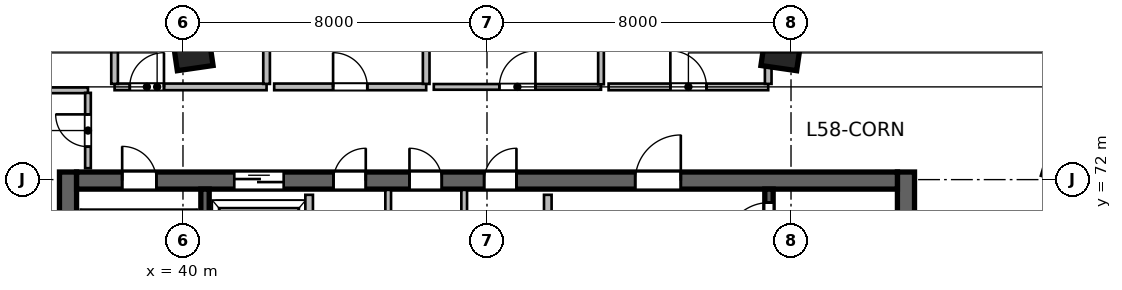
"""IFC4 building model, lengths in metres.
Left out: names, types, materials, properties, quantities, classifications, styles, units other than length and angle.
Written with IfcOpenShell. Run it as: python <this file> out.ifc"""

import sys

from ifc_helpers import new_model, si_unit, direction, frame, frame_2d, origin, origin_2d, place, context, subcontext, project, spatial, rectangle, extrude, source, transform, mapped, element, fill, save


model = new_model("IFC4")
c1 = context("Model", 3, precision=1e-05, world=origin(), true_north=direction((0.0, 1.0)))
c2 = subcontext(c1, "Body", "Model", "MODEL_VIEW")
j1 = project(units=[si_unit("LENGTHUNIT", "METRE"), si_unit("PLANEANGLEUNIT", "RADIAN")], contexts=[c1])
p1 = place(None, origin())
s1 = spatial("IfcSite", under=j1, at=p1, CompositionType="ELEMENT")
p2 = place(p1, origin())
s2 = spatial("IfcBuilding", under=s1, at=p2, CompositionType="ELEMENT")
p3 = place(p2, frame((0.0, 0.0, 239.1)))
s3 = spatial("IfcBuildingStorey", under=s2, at=p3, CompositionType="ELEMENT", Elevation=239.1)
m1 = source(origin(), c2, "Body", "SweptSolid", [
    extrude(rectangle(XDim=12.0, YDim=0.45, at=frame_2d((6.0, 0.0))), origin(), (0.0, 0.0, 1.0), 3.9),
])
for number, where, z_axis, x_axis in (
    (1, (36.975, 60.2, 0.0), (0.0, 0.0, 1.0), (0.0, 1.0, 0.0)),
    (2, (59.025, 60.2, 0.0), (0.0, 0.0, 1.0), (0.0, 1.0, 0.0)),
):
    element("IfcWall", number, at=place(p3, frame(where, z_axis=z_axis, x_axis=x_axis)), inside=s3, PredefinedType="SHEAR", context=c2, shape_type="MappedRepresentation", body=[
        mapped(m1, transform((0.0, 0.0, 0.0), scale=1.0)),
    ])
m2 = source(origin(), c2, "Body", "SweptSolid", [
    extrude(rectangle(XDim=21.6, YDim=0.45, at=frame_2d((10.8, 0.0))), origin(), (0.0, 0.0, 1.0), 3.9),
])
p4 = place(p3, frame((37.2, 71.975, 0.0), z_axis=(0.0, 0.0, 1.0), x_axis=(1.0, 0.0, 0.0)))
e3 = element("IfcWall", 3, at=p4, inside=s3, PredefinedType="SHEAR", context=c2, shape_type="MappedRepresentation", body=[
    mapped(m2, transform((0.0, 0.0, 0.0), scale=1.0)),
])
p5 = place(p4, frame((1.2, 0.0, 0.0)))
e4 = element("IfcOpeningElement", 4, at=p5, cuts=e3, PredefinedType="OPENING", context=c2, shape_type="SweptSolid", body=[
    extrude(rectangle(XDim=0.9, YDim=2.1, at=frame_2d((0.45, 1.05))), frame((0.0, 0.235, 0.0), z_axis=(0.0, -1.0, 0.0), x_axis=(1.0, 0.0, 0.0)), (0.0, 0.0, 1.0), 0.47),
])
p6 = place(p4, frame((14.7, 0.0, 0.0)))
e5 = element("IfcOpeningElement", 5, at=p6, cuts=e3, PredefinedType="OPENING", context=c2, shape_type="SweptSolid", body=[
    extrude(rectangle(XDim=1.2, YDim=2.15, at=frame_2d((0.6, 1.075))), frame((0.0, 0.235, 0.0), z_axis=(0.0, -1.0, 0.0), x_axis=(1.0, 0.0, 0.0)), (0.0, 0.0, 1.0), 0.47),
])
p7 = place(p4, frame((4.15, 0.0, 0.0)))
e6 = element("IfcOpeningElement", 6, at=p7, cuts=e3, PredefinedType="OPENING", context=c2, shape_type="SweptSolid", body=[
    extrude(rectangle(XDim=1.3, YDim=2.15, at=frame_2d((0.65, 1.075))), frame((0.0, 0.235, 0.0), z_axis=(0.0, -1.0, 0.0), x_axis=(1.0, 0.0, 0.0)), (0.0, 0.0, 1.0), 0.47),
])
p8 = place(p4, frame((6.76, 0.0, 0.0)))
e7 = element("IfcOpeningElement", 7, at=p8, cuts=e3, PredefinedType="OPENING", context=c2, shape_type="SweptSolid", body=[
    extrude(rectangle(XDim=0.85, YDim=2.1, at=frame_2d((0.425, 1.05))), frame((0.0, 0.235, 0.0), z_axis=(0.0, -1.0, 0.0), x_axis=(1.0, 0.0, 0.0)), (0.0, 0.0, 1.0), 0.47),
])
p9 = place(p4, frame((8.76, 0.0, 0.0)))
e8 = element("IfcOpeningElement", 8, at=p9, cuts=e3, PredefinedType="OPENING", context=c2, shape_type="SweptSolid", body=[
    extrude(rectangle(XDim=0.85, YDim=2.1, at=frame_2d((0.425, 1.05))), frame((0.0, 0.235, 0.0), z_axis=(0.0, -1.0, 0.0), x_axis=(1.0, 0.0, 0.0)), (0.0, 0.0, 1.0), 0.47),
])
p10 = place(p4, frame((10.725, 0.0, 0.0)))
e9 = element("IfcOpeningElement", 9, at=p10, cuts=e3, PredefinedType="OPENING", context=c2, shape_type="SweptSolid", body=[
    extrude(rectangle(XDim=0.85, YDim=2.1, at=frame_2d((0.425, 1.05))), frame((0.0, 0.235, 0.0), z_axis=(0.0, -1.0, 0.0), x_axis=(1.0, 0.0, 0.0)), (0.0, 0.0, 1.0), 0.47),
])
m3 = source(origin(), c2, "Body", "SweptSolid", [
    extrude(rectangle(XDim=11.1, YDim=0.22, at=frame_2d((5.55, 0.0))), origin(), (0.0, 0.0, 1.0), 3.9),
])
p11 = place(p3, frame((40.58, 60.65, 0.0), z_axis=(0.0, 0.0, 1.0), x_axis=(0.0, 1.0, 0.0)))
e10 = element("IfcWall", 10, at=p11, inside=s3, PredefinedType="SHEAR", context=c2, shape_type="MappedRepresentation", body=[
    mapped(m3, transform((0.0, 0.0, 0.0), scale=1.0)),
])
p12 = place(p3, frame((55.42, 60.65, 0.0), z_axis=(0.0, 0.0, 1.0), x_axis=(0.0, 1.0, 0.0)))
e11 = element("IfcWall", 11, at=p12, inside=s3, PredefinedType="SHEAR", context=c2, shape_type="MappedRepresentation", body=[
    mapped(m3, transform((0.0, 0.0, 0.0), scale=1.0)),
])
p13 = place(p12, frame((9.595, 0.0, 0.0)))
e12 = element("IfcOpeningElement", 12, at=p13, cuts=e11, PredefinedType="OPENING", context=c2, shape_type="SweptSolid", body=[
    extrude(rectangle(XDim=1.15, YDim=2.15, at=frame_2d((0.575, 1.075))), frame((0.0, 0.12, 0.0), z_axis=(0.0, -1.0, 0.0), x_axis=(1.0, 0.0, 0.0)), (0.0, 0.0, 1.0), 0.24),
])
m4 = source(origin(), c2, "Body", "SweptSolid", [
    extrude(rectangle(XDim=0.95, YDim=0.95, at=origin_2d()), origin(), (0.0, 0.0, 1.0), 3.9),
])
for number, where, z_axis, x_axis in (
    (13, (40.253, 75.404, 0.0), (0.0, 0.0, 1.0), (-0.143, 0.99, 0.0)),
    (14, (55.747, 75.404, 0.0), (0.0, 0.0, 1.0), (0.143, 0.99, 0.0)),
):
    element("IfcColumn", number, at=place(p3, frame(where, z_axis=z_axis, x_axis=x_axis)), inside=s3, PredefinedType="COLUMN", context=c2, shape_type="MappedRepresentation", body=[
        mapped(m4, transform((0.0, 0.0, 0.0), scale=1.0)),
    ])
m5 = source(origin(), c2, "Body", "SweptSolid", [
    extrude(rectangle(XDim=5.8, YDim=0.2, at=frame_2d((2.9, 0.0))), origin(), (0.0, 0.0, 1.0), 3.65),
])
p14 = place(p3, frame((49.6, 65.8, 0.0), z_axis=(0.0, 0.0, 1.0), x_axis=(0.0, 1.0, 0.0)))
e15 = element("IfcWall", 15, at=p14, inside=s3, PredefinedType="SOLIDWALL", context=c2, shape_type="MappedRepresentation", body=[
    mapped(m5, transform((0.0, 0.0, 0.0), scale=1.0)),
])
m6 = source(origin(), c2, "Body", "SweptSolid", [
    extrude(rectangle(XDim=3.2, YDim=0.2, at=frame_2d((1.6, 0.0))), origin(), (0.0, 0.0, 1.0), 3.65),
])
p15 = place(p3, frame((43.32, 68.4, 0.0), z_axis=(0.0, 0.0, 1.0), x_axis=(0.0, 1.0, 0.0)))
e16 = element("IfcWall", 16, at=p15, inside=s3, PredefinedType="SOLIDWALL", context=c2, shape_type="MappedRepresentation", body=[
    mapped(m6, transform((0.0, 0.0, 0.0), scale=1.0)),
])
m7 = source(origin(), c2, "Body", "SweptSolid", [
    extrude(rectangle(XDim=3.33, YDim=0.15, at=frame_2d((1.665, 0.0))), origin(), (0.0, 0.0, 1.0), 3.65),
])
for number, where, z_axis, x_axis in (
    (17, (45.4, 68.4, 0.0), (0.0, 0.0, 1.0), (0.0, 1.0, 0.0)),
    (18, (47.4, 68.4, 0.0), (0.0, 0.0, 1.0), (0.0, 1.0, 0.0)),
):
    element("IfcWall", number, at=place(p3, frame(where, z_axis=z_axis, x_axis=x_axis)), inside=s3, PredefinedType="PARTITIONING", context=c2, shape_type="MappedRepresentation", body=[
        mapped(m7, transform((0.0, 0.0, 0.0), scale=1.0)),
    ])
m8 = source(origin(), c2, "Body", "SweptSolid", [
    extrude(rectangle(XDim=3.1, YDim=0.15, at=frame_2d((1.55, 0.0))), origin(), (0.0, 0.0, 1.0), 3.081),
])
p16 = place(p3, frame((34.4, 74.35, 0.0), z_axis=(0.0, 0.0, 1.0), x_axis=(1.0, 0.0, 0.0)))
e19 = element("IfcWall", 19, at=p16, inside=s3, PredefinedType="PARTITIONING", context=c2, shape_type="MappedRepresentation", body=[
    mapped(m8, transform((0.0, 0.0, 0.0), scale=1.0)),
])
m9 = source(origin(), c2, "Body", "SweptSolid", [
    extrude(rectangle(XDim=1.982, YDim=0.15, at=frame_2d((0.991, 0.0))), origin(), (0.0, 0.0, 1.0), 3.65),
])
p17 = place(p3, frame((37.5, 72.3, 0.0), z_axis=(0.0, 0.0, 1.0), x_axis=(0.0, 1.0, 0.0)))
e20 = element("IfcWall", 20, at=p17, inside=s3, PredefinedType="PARTITIONING", context=c2, shape_type="MappedRepresentation", body=[
    mapped(m9, transform((0.0, 0.0, 0.0), scale=1.0)),
])
p18 = place(p17, frame((0.566, 0.0, 0.0)))
e21 = element("IfcOpeningElement", 21, at=p18, cuts=e20, PredefinedType="OPENING", context=c2, shape_type="SweptSolid", body=[
    extrude(rectangle(XDim=0.85, YDim=2.1, at=frame_2d((0.425, 1.05))), frame((0.0, 0.085, 0.0), z_axis=(0.0, -1.0, 0.0), x_axis=(1.0, 0.0, 0.0)), (0.0, 0.0, 1.0), 0.17),
])
m10 = source(origin(), c2, "Body", "SweptSolid", [
    extrude(rectangle(XDim=4.0, YDim=0.175, at=frame_2d((2.0, 0.0))), origin(), (0.0, 0.0, 1.0), 3.65),
])
p19 = place(p3, frame((38.2, 74.44, 0.0), z_axis=(0.0, 0.0, 1.0), x_axis=(1.0, 0.0, 0.0)))
e22 = element("IfcWall", 22, at=p19, inside=s3, PredefinedType="PARTITIONING", context=c2, shape_type="MappedRepresentation", body=[
    mapped(m10, transform((0.0, 0.0, 0.0), scale=1.0)),
])
p20 = place(p19, frame((0.4, 0.0, 0.0)))
e23 = element("IfcOpeningElement", 23, at=p20, cuts=e22, PredefinedType="OPENING", context=c2, shape_type="SweptSolid", body=[
    extrude(rectangle(XDim=0.9, YDim=2.08, at=frame_2d((0.45, 1.04))), frame((0.0, 0.098, 0.0), z_axis=(0.0, -1.0, 0.0), x_axis=(1.0, 0.0, 0.0)), (0.0, 0.0, 1.0), 0.195),
])
m11 = source(origin(), c2, "Body", "SweptSolid", [
    extrude(rectangle(XDim=2.403, YDim=0.175, at=frame_2d((1.201, 0.0))), origin(), (0.0, 0.0, 1.0), 3.65),
])
for number, where, z_axis, x_axis in (
    (24, (38.2, 74.519, 0.0), (0.0, 0.0, 1.0), (0.0, 1.0, 0.0)),
    (25, (42.2, 74.519, 0.0), (0.0, 0.0, 1.0), (0.0, 1.0, 0.0)),
):
    element("IfcWall", number, at=place(p3, frame(where, z_axis=z_axis, x_axis=x_axis)), inside=s3, PredefinedType="PARTITIONING", context=c2, shape_type="MappedRepresentation", body=[
        mapped(m11, transform((0.0, 0.0, 0.0), scale=1.0)),
    ])
p21 = place(p3, frame((42.4, 74.44, 0.0), z_axis=(0.0, 0.0, 1.0), x_axis=(1.0, 0.0, 0.0)))
e26 = element("IfcWall", 26, at=p21, inside=s3, PredefinedType="PARTITIONING", context=c2, shape_type="MappedRepresentation", body=[
    mapped(m10, transform((0.0, 0.0, 0.0), scale=1.0)),
])
p22 = place(p21, frame((1.55, 0.0, 0.0)))
e27 = element("IfcOpeningElement", 27, at=p22, cuts=e26, PredefinedType="OPENING", context=c2, shape_type="SweptSolid", body=[
    extrude(rectangle(XDim=0.9, YDim=2.08, at=frame_2d((0.45, 1.04))), frame((0.0, 0.098, 0.0), z_axis=(0.0, -1.0, 0.0), x_axis=(1.0, 0.0, 0.0)), (0.0, 0.0, 1.0), 0.195),
])
p23 = place(p3, frame((46.4, 74.519, 0.0), z_axis=(0.0, 0.0, 1.0), x_axis=(0.0, 1.0, 0.0)))
e28 = element("IfcWall", 28, at=p23, inside=s3, PredefinedType="PARTITIONING", context=c2, shape_type="MappedRepresentation", body=[
    mapped(m11, transform((0.0, 0.0, 0.0), scale=1.0)),
])
m12 = source(origin(), c2, "Body", "SweptSolid", [
    extrude(rectangle(XDim=4.4, YDim=0.15, at=frame_2d((2.2, 0.0))), origin(), (0.0, 0.0, 1.0), 3.65),
])
p24 = place(p3, frame((46.6, 74.44, 0.0), z_axis=(0.0, 0.0, 1.0), x_axis=(1.0, 0.0, 0.0)))
e29 = element("IfcWall", 29, at=p24, inside=s3, PredefinedType="PARTITIONING", context=c2, shape_type="MappedRepresentation", body=[
    mapped(m12, transform((0.0, 0.0, 0.0), scale=1.0)),
])
p25 = place(p24, frame((1.725, 0.0, 0.0)))
e30 = element("IfcOpeningElement", 30, at=p25, cuts=e29, PredefinedType="OPENING", context=c2, shape_type="SweptSolid", body=[
    extrude(rectangle(XDim=0.95, YDim=2.1, at=frame_2d((0.475, 1.05))), frame((0.0, 0.085, 0.0), z_axis=(0.0, -1.0, 0.0), x_axis=(1.0, 0.0, 0.0)), (0.0, 0.0, 1.0), 0.17),
])
m13 = source(origin(), c2, "Body", "SweptSolid", [
    extrude(rectangle(XDim=2.425, YDim=0.15, at=frame_2d((1.212, 0.0))), origin(), (0.0, 0.0, 1.0), 3.65),
])
p26 = place(p3, frame((51.0, 74.508, 0.0), z_axis=(0.0, 0.0, 1.0), x_axis=(0.0, 1.0, 0.0)))
e31 = element("IfcWall", 31, at=p26, inside=s3, PredefinedType="PARTITIONING", context=c2, shape_type="MappedRepresentation", body=[
    mapped(m13, transform((0.0, 0.0, 0.0), scale=1.0)),
])
m14 = source(origin(), c2, "Body", "SweptSolid", [
    extrude(rectangle(XDim=4.2, YDim=0.175, at=frame_2d((2.1, 0.0))), origin(), (0.0, 0.0, 1.0), 3.65),
])
p27 = place(p3, frame((51.2, 74.44, 0.0), z_axis=(0.0, 0.0, 1.0), x_axis=(1.0, 0.0, 0.0)))
e32 = element("IfcWall", 32, at=p27, inside=s3, PredefinedType="PARTITIONING", context=c2, shape_type="MappedRepresentation", body=[
    mapped(m14, transform((0.0, 0.0, 0.0), scale=1.0)),
])
p28 = place(p27, frame((1.625, 0.0, 0.0)))
e33 = element("IfcOpeningElement", 33, at=p28, cuts=e32, PredefinedType="OPENING", context=c2, shape_type="SweptSolid", body=[
    extrude(rectangle(XDim=0.95, YDim=2.12, at=frame_2d((0.475, 1.06))), frame((0.0, 0.098, 0.0), z_axis=(0.0, -1.0, 0.0), x_axis=(1.0, 0.0, 0.0)), (0.0, 0.0, 1.0), 0.195),
])
p29 = place(p3, frame((55.4, 74.519, 0.0), z_axis=(0.0, 0.0, 1.0), x_axis=(0.0, 1.0, 0.0)))
e34 = element("IfcWall", 34, at=p29, inside=s3, PredefinedType="PARTITIONING", context=c2, shape_type="MappedRepresentation", body=[
    mapped(m11, transform((0.0, 0.0, 0.0), scale=1.0)),
])
m15 = source(origin(), c2, "Body", "SweptSolid", [
    extrude(rectangle(XDim=0.9, YDim=2.1, at=frame_2d((0.45, 1.05))), frame((0.0, 0.025, 0.0), z_axis=(0.0, -1.0, 0.0), x_axis=(1.0, 0.0, 0.0)), (0.0, 0.0, 1.0), 0.05),
])
p30 = place(p5, origin())
e35 = element("IfcDoor", 35, at=p30, inside=s3, OperationType="SINGLE_SWING_LEFT", PredefinedType="DOOR", context=c2, shape_type="MappedRepresentation", body=[
    mapped(m15, transform((0.0, 0.0, 0.0), scale=1.0)),
])
fill(e4, e35)
m16 = source(origin(), c2, "Body", "SweptSolid", [
    extrude(rectangle(XDim=1.15, YDim=2.15, at=frame_2d((0.575, 1.075))), frame((0.0, 0.025, 0.0), z_axis=(0.0, -1.0, 0.0), x_axis=(1.0, 0.0, 0.0)), (0.0, 0.0, 1.0), 0.05),
])
p31 = place(p13, origin())
e36 = element("IfcDoor", 36, at=p31, inside=s3, OperationType="SINGLE_SWING_LEFT", PredefinedType="DOOR", context=c2, shape_type="MappedRepresentation", body=[
    mapped(m16, transform((0.0, 0.0, 0.0), scale=1.0)),
])
fill(e12, e36)
m17 = source(origin(), c2, "Body", "SweptSolid", [
    extrude(rectangle(XDim=1.2, YDim=2.15, at=frame_2d((0.6, 1.075))), frame((0.0, 0.025, 0.0), z_axis=(0.0, -1.0, 0.0), x_axis=(1.0, 0.0, 0.0)), (0.0, 0.0, 1.0), 0.05),
])
p32 = place(p6, origin())
e37 = element("IfcDoor", 37, at=p32, inside=s3, OperationType="SINGLE_SWING_RIGHT", PredefinedType="DOOR", context=c2, shape_type="MappedRepresentation", body=[
    mapped(m17, transform((0.0, 0.0, 0.0), scale=1.0)),
])
fill(e5, e37)
m18 = source(origin(), c2, "Body", "SweptSolid", [
    extrude(rectangle(XDim=1.3, YDim=2.15, at=frame_2d((0.65, 1.075))), frame((0.0, 0.025, 0.0), z_axis=(0.0, -1.0, 0.0), x_axis=(1.0, 0.0, 0.0)), (0.0, 0.0, 1.0), 0.05),
])
p33 = place(p7, origin())
e38 = element("IfcDoor", 38, at=p33, inside=s3, OperationType="DOUBLE_DOOR_SLIDING", PredefinedType="DOOR", context=c2, shape_type="MappedRepresentation", body=[
    mapped(m18, transform((0.0, 0.0, 0.0), scale=1.0)),
])
fill(e6, e38)
m19 = source(origin(), c2, "Body", "SweptSolid", [
    extrude(rectangle(XDim=0.85, YDim=2.1, at=frame_2d((0.425, 1.05))), frame((0.0, 0.025, 0.0), z_axis=(0.0, -1.0, 0.0), x_axis=(1.0, 0.0, 0.0)), (0.0, 0.0, 1.0), 0.05),
])
p34 = place(p8, origin())
e39 = element("IfcDoor", 39, at=p34, inside=s3, OperationType="SINGLE_SWING_RIGHT", PredefinedType="DOOR", context=c2, shape_type="MappedRepresentation", body=[
    mapped(m19, transform((0.0, 0.0, 0.0), scale=1.0)),
])
fill(e7, e39)
p35 = place(p9, origin())
e40 = element("IfcDoor", 40, at=p35, inside=s3, OperationType="SINGLE_SWING_LEFT", PredefinedType="DOOR", context=c2, shape_type="MappedRepresentation", body=[
    mapped(m19, transform((0.0, 0.0, 0.0), scale=1.0)),
])
fill(e8, e40)
p36 = place(p10, origin())
e41 = element("IfcDoor", 41, at=p36, inside=s3, OperationType="SINGLE_SWING_RIGHT", PredefinedType="DOOR", context=c2, shape_type="MappedRepresentation", body=[
    mapped(m19, transform((0.0, 0.0, 0.0), scale=1.0)),
])
fill(e9, e41)
p37 = place(p18, origin())
e42 = element("IfcDoor", 42, at=p37, inside=s3, OperationType="SINGLE_SWING_RIGHT", PredefinedType="DOOR", context=c2, shape_type="MappedRepresentation", body=[
    mapped(m19, transform((0.0, 0.0, 0.0), scale=1.0)),
])
fill(e21, e42)
m20 = source(origin(), c2, "Body", "SweptSolid", [
    extrude(rectangle(XDim=0.9, YDim=2.08, at=frame_2d((0.45, 1.04))), frame((0.0, 0.025, 0.0), z_axis=(0.0, -1.0, 0.0), x_axis=(1.0, 0.0, 0.0)), (0.0, 0.0, 1.0), 0.05),
])
p38 = place(p20, origin())
e43 = element("IfcDoor", 43, at=p38, inside=s3, OperationType="SINGLE_SWING_RIGHT", PredefinedType="DOOR", context=c2, shape_type="MappedRepresentation", body=[
    mapped(m20, transform((0.0, 0.0, 0.0), scale=1.0)),
])
fill(e23, e43)
p39 = place(p22, origin())
e44 = element("IfcDoor", 44, at=p39, inside=s3, OperationType="SINGLE_SWING_LEFT", PredefinedType="DOOR", context=c2, shape_type="MappedRepresentation", body=[
    mapped(m20, transform((0.0, 0.0, 0.0), scale=1.0)),
])
fill(e27, e44)
m21 = source(origin(), c2, "Body", "SweptSolid", [
    extrude(rectangle(XDim=0.95, YDim=2.1, at=frame_2d((0.475, 1.05))), frame((0.0, 0.025, 0.0), z_axis=(0.0, -1.0, 0.0), x_axis=(1.0, 0.0, 0.0)), (0.0, 0.0, 1.0), 0.05),
])
p40 = place(p25, origin())
e45 = element("IfcDoor", 45, at=p40, inside=s3, OperationType="SINGLE_SWING_RIGHT", PredefinedType="DOOR", context=c2, shape_type="MappedRepresentation", body=[
    mapped(m21, transform((0.0, 0.0, 0.0), scale=1.0)),
])
fill(e30, e45)
m22 = source(origin(), c2, "Body", "SweptSolid", [
    extrude(rectangle(XDim=0.95, YDim=2.12, at=frame_2d((0.475, 1.06))), frame((0.0, 0.025, 0.0), z_axis=(0.0, -1.0, 0.0), x_axis=(1.0, 0.0, 0.0)), (0.0, 0.0, 1.0), 0.05),
])
p41 = place(p28, origin())
e46 = element("IfcDoor", 46, at=p41, inside=s3, OperationType="SINGLE_SWING_LEFT", PredefinedType="DOOR", context=c2, shape_type="MappedRepresentation", body=[
    mapped(m22, transform((0.0, 0.0, 0.0), scale=1.0)),
])
fill(e33, e46)
save(model, sys.argv[1])
